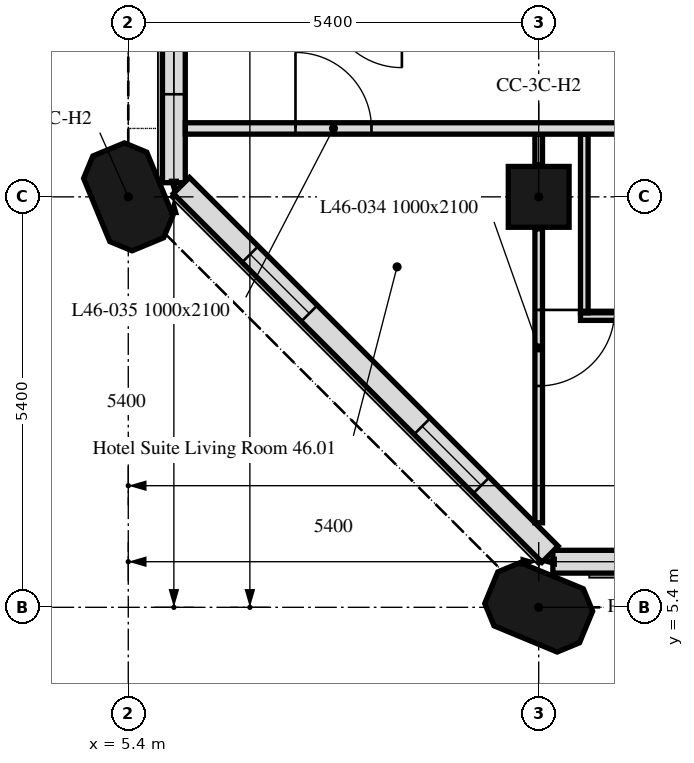
"""IFC4 building model, lengths in metres.
Left out: names, types, materials, properties, quantities, classifications, styles, units other than length and angle.
Written with IfcOpenShell. Run it as: python <this file> out.ifc"""

import sys

from ifc_helpers import new_model, si_unit, direction, frame, frame_2d, origin, origin_2d, place, context, subcontext, project, spatial, polyline, rectangle, outline, extrude, element, fill, save


model = new_model("IFC4")
c1 = context("Model", 3, precision=1e-05, world=origin(), true_north=direction((0.0, 1.0)))
c2 = subcontext(c1, "Body", "Model", "MODEL_VIEW")
j1 = project(units=[si_unit("LENGTHUNIT", "METRE"), si_unit("PLANEANGLEUNIT", "RADIAN")], contexts=[c1])
p1 = place(None, origin())
s1 = spatial("IfcSite", under=j1, at=p1, CompositionType="ELEMENT")
p2 = place(p1, origin())
s2 = spatial("IfcBuilding", under=s1, at=p2, CompositionType="ELEMENT")
p3 = place(p2, frame((0.0, 0.0, 190.6)))
s3 = spatial("IfcBuildingStorey", under=s2, at=p3, CompositionType="ELEMENT", Elevation=190.6)
for number, where, z_axis, x_axis in (
    (1, (10.8, 5.4, 0.0), (0.0, 0.0, 1.0), (-0.924, 0.383, 0.0)),
    (2, (5.4, 10.8, 0.0), (0.0, 0.0, 1.0), (-0.383, 0.924, 0.0)),
):
    element("IfcColumn", number, at=place(p3, frame(where, z_axis=z_axis, x_axis=x_axis)), inside=s3, PredefinedType="COLUMN", context=c2, shape_type="SweptSolid", body=[
        extrude(outline(polyline([(-0.45, -0.45), (0.45, -0.45), (0.675, -0.225), (0.675, 0.225), (0.45, 0.45), (-0.45, 0.45), (-0.675, 0.225), (-0.675, -0.225), (-0.45, -0.45)])), origin(), (0.0, 0.0, 1.0), 3.0),
    ])
p4 = place(p3, frame((10.8, 10.8, 0.0), z_axis=(0.0, 0.0, 1.0), x_axis=(1.0, 0.0, 0.0)))
e3 = element("IfcColumn", 3, at=p4, inside=s3, PredefinedType="COLUMN", context=c2, shape_type="SweptSolid", body=[
    extrude(rectangle(XDim=0.8, YDim=0.8, at=origin_2d()), origin(), (0.0, 0.0, 1.0), 3.0),
])
p5 = place(p3, frame((10.986, 6.0, 0.0), z_axis=(0.0, 0.0, 1.0), x_axis=(1.0, 0.0, 0.0)))
e4 = element("IfcWall", 4, at=p5, inside=s3, PredefinedType="SOLIDWALL", context=c2, shape_type="SweptSolid", body=[
    extrude(rectangle(XDim=32.027, YDim=0.3, at=frame_2d((16.014, 0.0))), origin(), (0.0, 0.0, 1.0), 3.0),
])
p6 = place(p5, frame((2.764, 0.0, 0.9)))
e5 = element("IfcOpeningElement", 5, at=p6, cuts=e4, PredefinedType="OPENING", context=c2, shape_type="SweptSolid", body=[
    extrude(rectangle(XDim=1.1, YDim=1.7, at=frame_2d((0.55, 0.85))), frame((0.0, 0.16, 0.0), z_axis=(0.0, -1.0, 0.0), x_axis=(1.0, 0.0, 0.0)), (0.0, 0.0, 1.0), 0.32),
])
p7 = place(p5, frame((6.214, 0.0, 0.9)))
e6 = element("IfcOpeningElement", 6, at=p7, cuts=e4, PredefinedType="OPENING", context=c2, shape_type="SweptSolid", body=[
    extrude(rectangle(XDim=3.4, YDim=1.7, at=frame_2d((1.7, 0.85))), frame((0.0, 0.16, 0.0), z_axis=(0.0, -1.0, 0.0), x_axis=(1.0, 0.0, 0.0)), (0.0, 0.0, 1.0), 0.32),
])
p8 = place(p5, frame((13.564, 0.0, 0.9)))
e7 = element("IfcOpeningElement", 7, at=p8, cuts=e4, PredefinedType="OPENING", context=c2, shape_type="SweptSolid", body=[
    extrude(rectangle(XDim=1.1, YDim=1.7, at=frame_2d((0.55, 0.85))), frame((0.0, 0.16, 0.0), z_axis=(0.0, -1.0, 0.0), x_axis=(1.0, 0.0, 0.0)), (0.0, 0.0, 1.0), 0.32),
])
p9 = place(p5, frame((17.014, 0.0, 0.9)))
e8 = element("IfcOpeningElement", 8, at=p9, cuts=e4, PredefinedType="OPENING", context=c2, shape_type="SweptSolid", body=[
    extrude(rectangle(XDim=3.4, YDim=1.7, at=frame_2d((1.7, 0.85))), frame((0.0, 0.16, 0.0), z_axis=(0.0, -1.0, 0.0), x_axis=(1.0, 0.0, 0.0)), (0.0, 0.0, 1.0), 0.32),
])
p10 = place(p5, frame((24.364, 0.0, 0.9)))
e9 = element("IfcOpeningElement", 9, at=p10, cuts=e4, PredefinedType="OPENING", context=c2, shape_type="SweptSolid", body=[
    extrude(rectangle(XDim=1.1, YDim=1.7, at=frame_2d((0.55, 0.85))), frame((0.0, 0.16, 0.0), z_axis=(0.0, -1.0, 0.0), x_axis=(1.0, 0.0, 0.0)), (0.0, 0.0, 1.0), 0.32),
])
p11 = place(p5, frame((27.814, 0.0, 0.9)))
e10 = element("IfcOpeningElement", 10, at=p11, cuts=e4, PredefinedType="OPENING", context=c2, shape_type="SweptSolid", body=[
    extrude(rectangle(XDim=3.4, YDim=1.7, at=frame_2d((1.7, 0.85))), frame((0.0, 0.16, 0.0), z_axis=(0.0, -1.0, 0.0), x_axis=(1.0, 0.0, 0.0)), (0.0, 0.0, 1.0), 0.32),
])
p12 = place(p3, frame((6.0, 16.2, 0.0), z_axis=(0.0, 0.0, 1.0), x_axis=(0.0, -1.0, 0.0)))
e11 = element("IfcWall", 11, at=p12, inside=s3, PredefinedType="SOLIDWALL", context=c2, shape_type="SweptSolid", body=[
    extrude(rectangle(XDim=5.214, YDim=0.3, at=frame_2d((2.607, 0.0))), origin(), (0.0, 0.0, 1.0), 3.0),
])
p13 = place(p12, frame((1.35, 0.0, 0.9)))
e12 = element("IfcOpeningElement", 12, at=p13, cuts=e11, PredefinedType="OPENING", context=c2, shape_type="SweptSolid", body=[
    extrude(rectangle(XDim=1.1, YDim=1.7, at=frame_2d((0.55, 0.85))), frame((0.0, 0.16, 0.0), z_axis=(0.0, -1.0, 0.0), x_axis=(1.0, 0.0, 0.0)), (0.0, 0.0, 1.0), 0.32),
])
p14 = place(p12, frame((2.95, 0.0, 0.9)))
e13 = element("IfcOpeningElement", 13, at=p14, cuts=e11, PredefinedType="OPENING", context=c2, shape_type="SweptSolid", body=[
    extrude(rectangle(XDim=1.1, YDim=1.7, at=frame_2d((0.55, 0.85))), frame((0.0, 0.16, 0.0), z_axis=(0.0, -1.0, 0.0), x_axis=(1.0, 0.0, 0.0)), (0.0, 0.0, 1.0), 0.32),
])
p15 = place(p3, frame((6.099, 10.949, 0.0), z_axis=(0.0, 0.0, 1.0), x_axis=(0.707106781187, -0.707106781187, 0.0)))
e14 = element("IfcWall", 14, at=p15, inside=s3, PredefinedType="SOLIDWALL", context=c2, shape_type="SweptSolid", body=[
    extrude(rectangle(XDim=6.86, YDim=0.3, at=frame_2d((3.43, 0.0))), origin(), (0.0, 0.0, 1.0), 3.0),
])
p16 = place(p15, frame((1.28, 0.0, 0.9)))
e15 = element("IfcOpeningElement", 15, at=p16, cuts=e14, PredefinedType="OPENING", context=c2, shape_type="SweptSolid", body=[
    extrude(rectangle(XDim=1.1, YDim=1.7, at=frame_2d((0.55, 0.85))), frame((0.0, 0.16, 0.0), z_axis=(0.0, -1.0, 0.0), x_axis=(1.0, 0.0, 0.0)), (0.0, 0.0, 1.0), 0.32),
])
p17 = place(p15, frame((4.48, 0.0, 0.9)))
e16 = element("IfcOpeningElement", 16, at=p17, cuts=e14, PredefinedType="OPENING", context=c2, shape_type="SweptSolid", body=[
    extrude(rectangle(XDim=1.1, YDim=1.7, at=frame_2d((0.55, 0.85))), frame((0.0, 0.16, 0.0), z_axis=(0.0, -1.0, 0.0), x_axis=(1.0, 0.0, 0.0)), (0.0, 0.0, 1.0), 0.32),
])
p18 = place(p3, frame((13.75, 9.225, 0.0), z_axis=(0.0, 0.0, 1.0), x_axis=(-1.0, 0.0, 0.0)))
e17 = element("IfcWall", 17, at=p18, inside=s3, PredefinedType="PARTITIONING", context=c2, shape_type="SweptSolid", body=[
    extrude(rectangle(XDim=2.4, YDim=0.1, at=frame_2d((1.2, 0.0))), origin(), (0.0, 0.0, 1.0), 3.0),
])
p19 = place(p18, frame((0.3, 0.0, 0.0)))
e18 = element("IfcOpeningElement", 18, at=p19, cuts=e17, PredefinedType="OPENING", context=c2, shape_type="SweptSolid", body=[
    extrude(rectangle(XDim=0.9, YDim=2.1, at=frame_2d((0.45, 1.05))), frame((0.0, 0.05, 0.0), z_axis=(0.0, -1.0, 0.0), x_axis=(1.0, 0.0, 0.0)), (0.0, 0.0, 1.0), 0.1),
])
p20 = place(p3, frame((11.4, 9.275, 0.0), z_axis=(0.0, 0.0, 1.0), x_axis=(0.0, 1.0, 0.0)))
e19 = element("IfcWall", 19, at=p20, inside=s3, PredefinedType="PARTITIONING", context=c2, shape_type="SweptSolid", body=[
    extrude(rectangle(XDim=2.35, YDim=0.1, at=frame_2d((1.175, 0.0))), origin(), (0.0, 0.0, 1.0), 3.0),
])
p21 = place(p3, frame((10.8, 11.625, 0.0), z_axis=(0.0, 0.0, 1.0), x_axis=(0.0, -1.0, 0.0)))
e20 = element("IfcWall", 20, at=p21, inside=s3, PredefinedType="PARTITIONING", context=c2, shape_type="SweptSolid", body=[
    extrude(rectangle(XDim=0.405, YDim=0.1, at=frame_2d((0.203, 0.0))), origin(), (0.0, 0.0, 1.0), 3.0),
])
p22 = place(p3, frame((10.8, 10.38, 0.0), z_axis=(0.0, 0.0, 1.0), x_axis=(0.0, -1.0, 0.0)))
e21 = element("IfcWall", 21, at=p22, inside=s3, PredefinedType="PARTITIONING", context=c2, shape_type="SweptSolid", body=[
    extrude(rectangle(XDim=3.868, YDim=0.1, at=frame_2d((1.934, 0.0))), origin(), (0.0, 0.0, 1.0), 3.0),
])
p23 = place(p22, frame((1.067, 0.0, 0.0)))
e22 = element("IfcOpeningElement", 22, at=p23, cuts=e21, PredefinedType="OPENING", context=c2, shape_type="SweptSolid", body=[
    extrude(rectangle(XDim=1.0, YDim=2.1, at=frame_2d((0.5, 1.05))), frame((0.0, 0.05, 0.0), z_axis=(0.0, -1.0, 0.0), x_axis=(1.0, 0.0, 0.0)), (0.0, 0.0, 1.0), 0.1),
])
p24 = place(p3, frame((6.151, 11.7, 0.0), z_axis=(0.0, 0.0, 1.0), x_axis=(1.0, 0.0, 0.0)))
e23 = element("IfcWall", 23, at=p24, inside=s3, PredefinedType="PARTITIONING", context=c2, shape_type="SweptSolid", body=[
    extrude(rectangle(XDim=41.698, YDim=0.15, at=frame_2d((20.849, 0.0))), origin(), (0.0, 0.0, 1.0), 3.0),
])
p25 = place(p24, frame((17.649, 0.0, 0.0)))
e24 = element("IfcOpeningElement", 24, at=p25, cuts=e23, PredefinedType="OPENING", context=c2, shape_type="SweptSolid", body=[
    extrude(rectangle(XDim=1.0, YDim=2.1, at=frame_2d((0.5, 1.05))), frame((0.0, 0.075, 0.0), z_axis=(0.0, -1.0, 0.0), x_axis=(1.0, 0.0, 0.0)), (0.0, 0.0, 1.0), 0.15),
])
p26 = place(p24, frame((1.449, 0.0, 0.0)))
e25 = element("IfcOpeningElement", 25, at=p26, cuts=e23, PredefinedType="OPENING", context=c2, shape_type="SweptSolid", body=[
    extrude(rectangle(XDim=1.0, YDim=2.1, at=frame_2d((0.5, 1.05))), frame((0.0, 0.075, 0.0), z_axis=(0.0, -1.0, 0.0), x_axis=(1.0, 0.0, 0.0)), (0.0, 0.0, 1.0), 0.15),
])
p27 = place(p24, frame((29.249, 0.0, 0.0)))
e26 = element("IfcOpeningElement", 26, at=p27, cuts=e23, PredefinedType="OPENING", context=c2, shape_type="SweptSolid", body=[
    extrude(rectangle(XDim=1.0, YDim=2.1, at=frame_2d((0.5, 1.05))), frame((0.0, 0.075, 0.0), z_axis=(0.0, -1.0, 0.0), x_axis=(1.0, 0.0, 0.0)), (0.0, 0.0, 1.0), 0.15),
])
p28 = place(p24, frame((37.954, 0.0, 0.0)))
e27 = element("IfcOpeningElement", 27, at=p28, cuts=e23, PredefinedType="OPENING", context=c2, shape_type="SweptSolid", body=[
    extrude(rectangle(XDim=1.0, YDim=2.1, at=frame_2d((0.5, 1.05))), frame((0.0, 0.075, 0.0), z_axis=(0.0, -1.0, 0.0), x_axis=(1.0, 0.0, 0.0)), (0.0, 0.0, 1.0), 0.15),
])
p29 = place(p14, origin())
e28 = element("IfcWindow", 28, at=p29, inside=s3, PartitioningType="SINGLE_PANEL", PredefinedType="WINDOW", context=c2, shape_type="SweptSolid", body=[
    extrude(rectangle(XDim=1.1, YDim=1.7, at=frame_2d((0.55, 0.85))), frame((0.0, 0.03, 0.0), z_axis=(0.0, -1.0, 0.0), x_axis=(1.0, 0.0, 0.0)), (0.0, 0.0, 1.0), 0.06),
])
fill(e13, e28)
p30 = place(p16, origin())
e29 = element("IfcWindow", 29, at=p30, inside=s3, PartitioningType="SINGLE_PANEL", PredefinedType="WINDOW", context=c2, shape_type="SweptSolid", body=[
    extrude(rectangle(XDim=1.1, YDim=1.7, at=frame_2d((0.55, 0.85))), frame((0.0, 0.03, 0.0), z_axis=(0.0, -1.0, 0.0), x_axis=(1.0, 0.0, 0.0)), (0.0, 0.0, 1.0), 0.06),
])
fill(e15, e29)
p31 = place(p17, origin())
e30 = element("IfcWindow", 30, at=p31, inside=s3, PartitioningType="SINGLE_PANEL", PredefinedType="WINDOW", context=c2, shape_type="SweptSolid", body=[
    extrude(rectangle(XDim=1.1, YDim=1.7, at=frame_2d((0.55, 0.85))), frame((0.0, 0.03, 0.0), z_axis=(0.0, -1.0, 0.0), x_axis=(1.0, 0.0, 0.0)), (0.0, 0.0, 1.0), 0.06),
])
fill(e16, e30)
p32 = place(p23, origin())
e31 = element("IfcDoor", 31, at=p32, inside=s3, OperationType="SINGLE_SWING_LEFT", PredefinedType="DOOR", context=c2, shape_type="SweptSolid", body=[
    extrude(rectangle(XDim=1.0, YDim=2.1, at=frame_2d((0.5, 1.05))), frame((0.0, 0.025, 0.0), z_axis=(0.0, -1.0, 0.0), x_axis=(1.0, 0.0, 0.0)), (0.0, 0.0, 1.0), 0.05),
])
fill(e22, e31)
p33 = place(p26, origin())
e32 = element("IfcDoor", 32, at=p33, inside=s3, OperationType="SINGLE_SWING_RIGHT", PredefinedType="DOOR", context=c2, shape_type="SweptSolid", body=[
    extrude(rectangle(XDim=1.0, YDim=2.1, at=frame_2d((0.5, 1.05))), frame((0.0, 0.025, 0.0), z_axis=(0.0, -1.0, 0.0), x_axis=(1.0, 0.0, 0.0)), (0.0, 0.0, 1.0), 0.05),
])
fill(e25, e32)
save(model, sys.argv[1])
